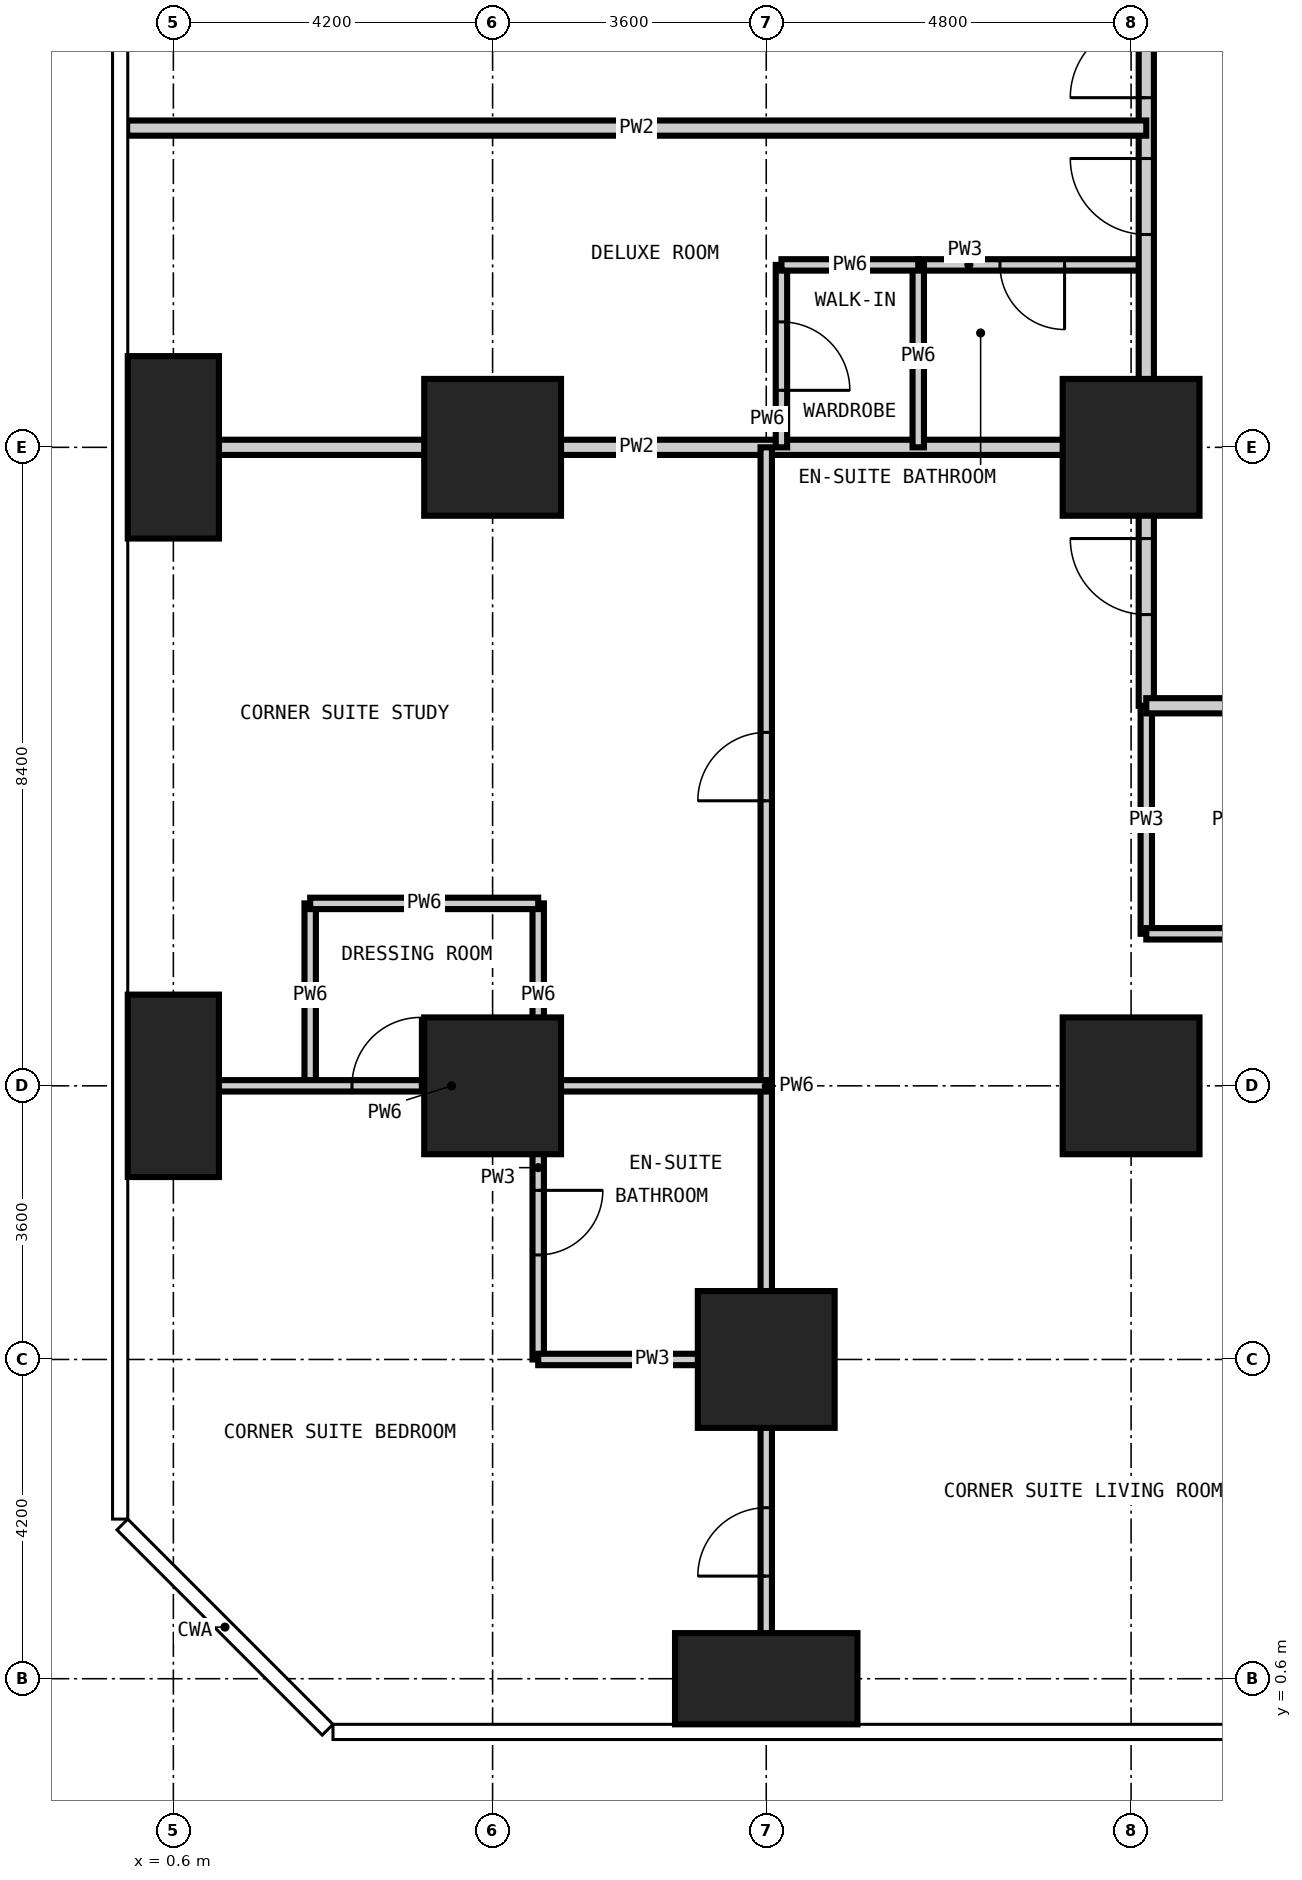
"""IFC4 building model, lengths in metres.
Left out: names, types, materials, properties, quantities, classifications, styles, units other than length and angle.
Written with IfcOpenShell. Run it as: python <this file> out.ifc"""

import sys

from ifc_helpers import new_model, si_unit, direction, frame, frame_2d, origin, origin_2d, place, context, subcontext, project, spatial, rectangle, extrude, element, fill, save


model = new_model("IFC4")
c1 = context("Model", 3, precision=1e-05, world=origin(), true_north=direction((0.0, 1.0)))
c2 = subcontext(c1, "Body", "Model", "MODEL_VIEW")
j1 = project(units=[si_unit("LENGTHUNIT", "METRE"), si_unit("PLANEANGLEUNIT", "RADIAN")], contexts=[c1])
p1 = place(None, origin())
s1 = spatial("IfcSite", under=j1, at=p1, CompositionType="ELEMENT")
p2 = place(p1, origin())
s2 = spatial("IfcBuilding", under=s1, at=p2, CompositionType="ELEMENT")
p3 = place(p2, frame((0.0, 0.0, 27.0)))
s3 = spatial("IfcBuildingStorey", under=s2, at=p3, CompositionType="ELEMENT", Elevation=27.0)
for number, where, z_axis, x_axis in (
    (1, (0.6, 8.4, -0.35), (0.0, 0.0, 1.0), (1.0, 0.0, 0.0)),
    (2, (0.6, 16.8, -0.35), (0.0, 0.0, 1.0), (1.0, 0.0, 0.0)),
):
    element("IfcColumn", number, at=place(p3, frame(where, z_axis=z_axis, x_axis=x_axis)), inside=s3, PredefinedType="COLUMN", context=c2, shape_type="SweptSolid", body=[
        extrude(rectangle(XDim=1.2, YDim=2.4, at=origin_2d()), origin(), (0.0, 0.0, 1.0), 3.6),
    ])
for number, where, z_axis, x_axis in (
    (3, (4.8, 8.4, -0.35), (0.0, 0.0, 1.0), (1.0, 0.0, 0.0)),
    (4, (4.8, 16.8, -0.35), (0.0, 0.0, 1.0), (1.0, 0.0, 0.0)),
):
    element("IfcColumn", number, at=place(p3, frame(where, z_axis=z_axis, x_axis=x_axis)), inside=s3, PredefinedType="COLUMN", context=c2, shape_type="SweptSolid", body=[
        extrude(rectangle(XDim=1.8, YDim=1.8, at=origin_2d()), origin(), (0.0, 0.0, 1.0), 3.6),
    ])
p4 = place(p3, frame((8.4, 0.6, -0.35), z_axis=(0.0, 0.0, 1.0), x_axis=(1.0, 0.0, 0.0)))
e5 = element("IfcColumn", 5, at=p4, inside=s3, PredefinedType="COLUMN", context=c2, shape_type="SweptSolid", body=[
    extrude(rectangle(XDim=2.4, YDim=1.2, at=origin_2d()), origin(), (0.0, 0.0, 1.0), 3.6),
])
for number, where, z_axis, x_axis in (
    (6, (8.4, 4.8, -0.35), (0.0, 0.0, 1.0), (1.0, 0.0, 0.0)),
    (7, (13.2, 8.4, -0.35), (0.0, 0.0, 1.0), (1.0, 0.0, 0.0)),
    (8, (13.2, 16.8, -0.35), (0.0, 0.0, 1.0), (1.0, 0.0, 0.0)),
):
    element("IfcColumn", number, at=place(p3, frame(where, z_axis=z_axis, x_axis=x_axis)), inside=s3, PredefinedType="COLUMN", context=c2, shape_type="SweptSolid", body=[
        extrude(rectangle(XDim=1.8, YDim=1.8, at=origin_2d()), origin(), (0.0, 0.0, 1.0), 3.6),
    ])
p5 = place(p3, frame((5.4, 4.8, 0.0), z_axis=(0.0, 0.0, 1.0), x_axis=(0.0, 1.0, 0.0)))
e9 = element("IfcWall", 9, at=p5, inside=s3, PredefinedType="PARTITIONING", context=c2, shape_type="SweptSolid", body=[
    extrude(rectangle(XDim=3.6, YDim=0.15, at=frame_2d((1.8, 0.0))), origin(), (0.0, 0.0, 1.0), 3.25),
])
p6 = place(p5, frame((1.375, 0.0, 0.0)))
e10 = element("IfcOpeningElement", 10, at=p6, cuts=e9, PredefinedType="OPENING", context=c2, shape_type="SweptSolid", body=[
    extrude(rectangle(XDim=0.85, YDim=2.1, at=frame_2d((0.425, 1.05))), frame((0.0, 0.085, 0.0), z_axis=(0.0, -1.0, 0.0), x_axis=(1.0, 0.0, 0.0)), (0.0, 0.0, 1.0), 0.17),
])
for number, where, z_axis, x_axis in (
    (11, (13.4, 10.4, 0.0), (0.0, 0.0, 1.0), (0.0, 1.0, 0.0)),
    (12, (5.4, 4.8, 0.0), (0.0, 0.0, 1.0), (1.0, 0.0, 0.0)),
):
    element("IfcWall", number, at=place(p3, frame(where, z_axis=z_axis, x_axis=x_axis)), inside=s3, PredefinedType="PARTITIONING", context=c2, shape_type="SweptSolid", body=[
        extrude(rectangle(XDim=3.0, YDim=0.15, at=frame_2d((1.5, 0.0))), origin(), (0.0, 0.0, 1.0), 3.25),
    ])
p7 = place(p3, frame((13.4, 10.4, 0.0), z_axis=(0.0, 0.0, 1.0), x_axis=(1.0, 0.0, 0.0)))
e13 = element("IfcWall", 13, at=p7, inside=s3, PredefinedType="PARTITIONING", context=c2, shape_type="SweptSolid", body=[
    extrude(rectangle(XDim=3.4, YDim=0.15, at=frame_2d((1.7, 0.0))), origin(), (0.0, 0.0, 1.0), 3.25),
])
p8 = place(p7, frame((1.275, 0.0, 0.0)))
e14 = element("IfcOpeningElement", 14, at=p8, cuts=e13, PredefinedType="OPENING", context=c2, shape_type="SweptSolid", body=[
    extrude(rectangle(XDim=0.85, YDim=2.1, at=frame_2d((0.425, 1.05))), frame((0.0, 0.085, 0.0), z_axis=(0.0, -1.0, 0.0), x_axis=(1.0, 0.0, 0.0)), (0.0, 0.0, 1.0), 0.17),
])
p9 = place(p3, frame((10.4, 19.2, 0.0), z_axis=(0.0, 0.0, 1.0), x_axis=(1.0, 0.0, 0.0)))
e15 = element("IfcWall", 15, at=p9, inside=s3, PredefinedType="PARTITIONING", context=c2, shape_type="SweptSolid", body=[
    extrude(rectangle(XDim=3.0, YDim=0.15, at=frame_2d((1.5, 0.0))), origin(), (0.0, 0.0, 1.0), 3.25),
])
p10 = place(p9, frame((1.075, 0.0, 0.0)))
e16 = element("IfcOpeningElement", 16, at=p10, cuts=e15, PredefinedType="OPENING", context=c2, shape_type="SweptSolid", body=[
    extrude(rectangle(XDim=0.85, YDim=2.1, at=frame_2d((0.425, 1.05))), frame((0.0, 0.085, 0.0), z_axis=(0.0, -1.0, 0.0), x_axis=(1.0, 0.0, 0.0)), (0.0, 0.0, 1.0), 0.17),
])
p11 = place(p3, frame((13.4, 13.4, 0.0), z_axis=(0.0, 0.0, 1.0), x_axis=(0.0, 1.0, 0.0)))
e17 = element("IfcWall", 17, at=p11, inside=s3, PredefinedType="PARTITIONING", context=c2, shape_type="SweptSolid", body=[
    extrude(rectangle(XDim=20.2, YDim=0.2, at=frame_2d((10.1, 0.0))), origin(), (0.0, 0.0, 1.0), 3.25),
])
p12 = place(p11, frame((6.2, 0.0, 0.0)))
e18 = element("IfcOpeningElement", 18, at=p12, cuts=e17, PredefinedType="OPENING", context=c2, shape_type="SweptSolid", body=[
    extrude(rectangle(XDim=1.0, YDim=2.2, at=frame_2d((0.5, 1.1))), frame((0.0, 0.11, 0.0), z_axis=(0.0, -1.0, 0.0), x_axis=(1.0, 0.0, 0.0)), (0.0, 0.0, 1.0), 0.22),
])
p13 = place(p11, frame((8.0, 0.0, 0.0)))
e19 = element("IfcOpeningElement", 19, at=p13, cuts=e17, PredefinedType="OPENING", context=c2, shape_type="SweptSolid", body=[
    extrude(rectangle(XDim=1.0, YDim=2.2, at=frame_2d((0.5, 1.1))), frame((0.0, 0.11, 0.0), z_axis=(0.0, -1.0, 0.0), x_axis=(1.0, 0.0, 0.0)), (0.0, 0.0, 1.0), 0.22),
])
p14 = place(p11, frame((14.6, 0.0, 0.0)))
e20 = element("IfcOpeningElement", 20, at=p14, cuts=e17, PredefinedType="OPENING", context=c2, shape_type="SweptSolid", body=[
    extrude(rectangle(XDim=1.0, YDim=2.2, at=frame_2d((0.5, 1.1))), frame((0.0, 0.11, 0.0), z_axis=(0.0, -1.0, 0.0), x_axis=(1.0, 0.0, 0.0)), (0.0, 0.0, 1.0), 0.22),
])
p15 = place(p11, frame((16.4, 0.0, 0.0)))
e21 = element("IfcOpeningElement", 21, at=p15, cuts=e17, PredefinedType="OPENING", context=c2, shape_type="SweptSolid", body=[
    extrude(rectangle(XDim=1.0, YDim=2.2, at=frame_2d((0.5, 1.1))), frame((0.0, 0.11, 0.0), z_axis=(0.0, -1.0, 0.0), x_axis=(1.0, 0.0, 0.0)), (0.0, 0.0, 1.0), 0.22),
])
p16 = place(p11, frame((1.2, 0.0, 0.0)))
e22 = element("IfcOpeningElement", 22, at=p16, cuts=e17, PredefinedType="OPENING", context=c2, shape_type="SweptSolid", body=[
    extrude(rectangle(XDim=1.0, YDim=2.2, at=frame_2d((0.5, 1.1))), frame((0.0, 0.11, 0.0), z_axis=(0.0, -1.0, 0.0), x_axis=(1.0, 0.0, 0.0)), (0.0, 0.0, 1.0), 0.22),
])
p17 = place(p3, frame((45.7, 13.4, 0.0), z_axis=(0.0, 0.0, 1.0), x_axis=(-1.0, 0.0, 0.0)))
e23 = element("IfcWall", 23, at=p17, inside=s3, PredefinedType="PARTITIONING", context=c2, shape_type="SweptSolid", body=[
    extrude(rectangle(XDim=32.3, YDim=0.2, at=frame_2d((16.15, 0.0))), origin(), (0.0, 0.0, 1.0), 3.25),
])
p18 = place(p17, frame((25.1, 0.0, 0.0)))
e24 = element("IfcOpeningElement", 24, at=p18, cuts=e23, PredefinedType="OPENING", context=c2, shape_type="SweptSolid", body=[
    extrude(rectangle(XDim=1.0, YDim=2.2, at=frame_2d((0.5, 1.1))), frame((0.0, 0.11, 0.0), z_axis=(0.0, -1.0, 0.0), x_axis=(1.0, 0.0, 0.0)), (0.0, 0.0, 1.0), 0.22),
])
p19 = place(p17, frame((23.3, 0.0, 0.0)))
e25 = element("IfcOpeningElement", 25, at=p19, cuts=e23, PredefinedType="OPENING", context=c2, shape_type="SweptSolid", body=[
    extrude(rectangle(XDim=1.0, YDim=2.2, at=frame_2d((0.5, 1.1))), frame((0.0, 0.11, 0.0), z_axis=(0.0, -1.0, 0.0), x_axis=(1.0, 0.0, 0.0)), (0.0, 0.0, 1.0), 0.22),
])
p20 = place(p17, frame((16.7, 0.0, 0.0)))
e26 = element("IfcOpeningElement", 26, at=p20, cuts=e23, PredefinedType="OPENING", context=c2, shape_type="SweptSolid", body=[
    extrude(rectangle(XDim=1.0, YDim=2.2, at=frame_2d((0.5, 1.1))), frame((0.0, 0.11, 0.0), z_axis=(0.0, -1.0, 0.0), x_axis=(1.0, 0.0, 0.0)), (0.0, 0.0, 1.0), 0.22),
])
p21 = place(p17, frame((14.9, 0.0, 0.0)))
e27 = element("IfcOpeningElement", 27, at=p21, cuts=e23, PredefinedType="OPENING", context=c2, shape_type="SweptSolid", body=[
    extrude(rectangle(XDim=1.0, YDim=2.2, at=frame_2d((0.5, 1.1))), frame((0.0, 0.11, 0.0), z_axis=(0.0, -1.0, 0.0), x_axis=(1.0, 0.0, 0.0)), (0.0, 0.0, 1.0), 0.22),
])
p22 = place(p17, frame((8.3, 0.0, 0.0)))
e28 = element("IfcOpeningElement", 28, at=p22, cuts=e23, PredefinedType="OPENING", context=c2, shape_type="SweptSolid", body=[
    extrude(rectangle(XDim=1.0, YDim=2.2, at=frame_2d((0.5, 1.1))), frame((0.0, 0.11, 0.0), z_axis=(0.0, -1.0, 0.0), x_axis=(1.0, 0.0, 0.0)), (0.0, 0.0, 1.0), 0.22),
])
p23 = place(p17, frame((6.5, 0.0, 0.0)))
e29 = element("IfcOpeningElement", 29, at=p23, cuts=e23, PredefinedType="OPENING", context=c2, shape_type="SweptSolid", body=[
    extrude(rectangle(XDim=1.0, YDim=2.2, at=frame_2d((0.5, 1.1))), frame((0.0, 0.11, 0.0), z_axis=(0.0, -1.0, 0.0), x_axis=(1.0, 0.0, 0.0)), (0.0, 0.0, 1.0), 0.22),
])
for number, where, z_axis, x_axis in (
    (30, (-0.008, 16.8, 0.0), (0.0, 0.0, 1.0), (1.0, 0.0, 0.0)),
    (31, (-0.008, 21.0, 0.0), (0.0, 0.0, 1.0), (1.0, 0.0, 0.0)),
):
    element("IfcWall", number, at=place(p3, frame(where, z_axis=z_axis, x_axis=x_axis)), inside=s3, PredefinedType="PARTITIONING", context=c2, shape_type="SweptSolid", body=[
        extrude(rectangle(XDim=13.408, YDim=0.2, at=frame_2d((6.704, 0.0))), origin(), (0.0, 0.0, 1.0), 3.25),
    ])
for number, where, z_axis, x_axis in (
    (32, (2.4, 8.4, 0.0), (0.0, 0.0, 1.0), (0.0, 1.0, 0.0)),
    (33, (5.4, 8.4, 0.0), (0.0, 0.0, 1.0), (0.0, 1.0, 0.0)),
):
    element("IfcWall", number, at=place(p3, frame(where, z_axis=z_axis, x_axis=x_axis)), inside=s3, PredefinedType="PARTITIONING", context=c2, shape_type="SweptSolid", body=[
        extrude(rectangle(XDim=2.4, YDim=0.15, at=frame_2d((1.2, 0.0))), origin(), (0.0, 0.0, 1.0), 3.25),
    ])
p24 = place(p3, frame((8.4, -0.008, 0.0), z_axis=(0.0, 0.0, 1.0), x_axis=(0.0, 1.0, 0.0)))
e34 = element("IfcWall", 34, at=p24, inside=s3, PredefinedType="PARTITIONING", context=c2, shape_type="SweptSolid", body=[
    extrude(rectangle(XDim=16.808, YDim=0.15, at=frame_2d((8.404, 0.0))), origin(), (0.0, 0.0, 1.0), 3.25),
])
p25 = place(p24, frame((1.958, 0.0, 0.0)))
e35 = element("IfcOpeningElement", 35, at=p25, cuts=e34, PredefinedType="OPENING", context=c2, shape_type="SweptSolid", body=[
    extrude(rectangle(XDim=0.9, YDim=2.1, at=frame_2d((0.45, 1.05))), frame((0.0, 0.085, 0.0), z_axis=(0.0, -1.0, 0.0), x_axis=(1.0, 0.0, 0.0)), (0.0, 0.0, 1.0), 0.17),
])
p26 = place(p24, frame((12.158, 0.0, 0.0)))
e36 = element("IfcOpeningElement", 36, at=p26, cuts=e34, PredefinedType="OPENING", context=c2, shape_type="SweptSolid", body=[
    extrude(rectangle(XDim=0.9, YDim=2.1, at=frame_2d((0.45, 1.05))), frame((0.0, 0.085, 0.0), z_axis=(0.0, -1.0, 0.0), x_axis=(1.0, 0.0, 0.0)), (0.0, 0.0, 1.0), 0.17),
])
p27 = place(p3, frame((8.6, 16.8, 0.0), z_axis=(0.0, 0.0, 1.0), x_axis=(0.0, 1.0, 0.0)))
e37 = element("IfcWall", 37, at=p27, inside=s3, PredefinedType="PARTITIONING", context=c2, shape_type="SweptSolid", body=[
    extrude(rectangle(XDim=2.4, YDim=0.15, at=frame_2d((1.2, 0.0))), origin(), (0.0, 0.0, 1.0), 3.25),
])
p28 = place(p27, frame((0.75, 0.0, 0.0)))
e38 = element("IfcOpeningElement", 38, at=p28, cuts=e37, PredefinedType="OPENING", context=c2, shape_type="SweptSolid", body=[
    extrude(rectangle(XDim=0.9, YDim=2.1, at=frame_2d((0.45, 1.05))), frame((0.0, 0.085, 0.0), z_axis=(0.0, -1.0, 0.0), x_axis=(1.0, 0.0, 0.0)), (0.0, 0.0, 1.0), 0.17),
])
p29 = place(p3, frame((10.4, 16.8, 0.0), z_axis=(0.0, 0.0, 1.0), x_axis=(0.0, 1.0, 0.0)))
e39 = element("IfcWall", 39, at=p29, inside=s3, PredefinedType="PARTITIONING", context=c2, shape_type="SweptSolid", body=[
    extrude(rectangle(XDim=2.4, YDim=0.15, at=frame_2d((1.2, 0.0))), origin(), (0.0, 0.0, 1.0), 3.25),
])
p30 = place(p3, frame((-0.008, 8.4, 0.0), z_axis=(0.0, 0.0, 1.0), x_axis=(1.0, 0.0, 0.0)))
e40 = element("IfcWall", 40, at=p30, inside=s3, PredefinedType="PARTITIONING", context=c2, shape_type="SweptSolid", body=[
    extrude(rectangle(XDim=8.408, YDim=0.15, at=frame_2d((4.204, 0.0))), origin(), (0.0, 0.0, 1.0), 3.25),
])
p31 = place(p30, frame((2.958, 0.0, 0.0)))
e41 = element("IfcOpeningElement", 41, at=p31, cuts=e40, PredefinedType="OPENING", context=c2, shape_type="SweptSolid", body=[
    extrude(rectangle(XDim=0.9, YDim=2.1, at=frame_2d((0.45, 1.05))), frame((0.0, 0.085, 0.0), z_axis=(0.0, -1.0, 0.0), x_axis=(1.0, 0.0, 0.0)), (0.0, 0.0, 1.0), 0.17),
])
p32 = place(p3, frame((2.4, 10.8, 0.0), z_axis=(0.0, 0.0, 1.0), x_axis=(1.0, 0.0, 0.0)))
e42 = element("IfcWall", 42, at=p32, inside=s3, PredefinedType="PARTITIONING", context=c2, shape_type="SweptSolid", body=[
    extrude(rectangle(XDim=3.0, YDim=0.15, at=frame_2d((1.5, 0.0))), origin(), (0.0, 0.0, 1.0), 3.25),
])
p33 = place(p3, frame((8.6, 19.2, 0.0), z_axis=(0.0, 0.0, 1.0), x_axis=(1.0, 0.0, 0.0)))
e43 = element("IfcWall", 43, at=p33, inside=s3, PredefinedType="PARTITIONING", context=c2, shape_type="SweptSolid", body=[
    extrude(rectangle(XDim=1.8, YDim=0.15, at=frame_2d((0.9, 0.0))), origin(), (0.0, 0.0, 1.0), 3.25),
])
p34 = place(p12, origin())
e44 = element("IfcDoor", 44, at=p34, inside=s3, OperationType="SINGLE_SWING_RIGHT", PredefinedType="DOOR", context=c2, shape_type="SweptSolid", body=[
    extrude(rectangle(XDim=1.0, YDim=2.2, at=frame_2d((0.5, 1.1))), frame((0.0, 0.025, 0.0), z_axis=(0.0, -1.0, 0.0), x_axis=(1.0, 0.0, 0.0)), (0.0, 0.0, 1.0), 0.05),
])
fill(e18, e44)
p35 = place(p10, frame((0.85, 0.0, 0.0), z_axis=(0.0, 0.0, 1.0), x_axis=(-1.0, 0.0, 0.0)))
e45 = element("IfcDoor", 45, at=p35, inside=s3, OperationType="SINGLE_SWING_LEFT", PredefinedType="DOOR", context=c2, shape_type="SweptSolid", body=[
    extrude(rectangle(XDim=0.85, YDim=2.1, at=frame_2d((0.425, 1.05))), frame((0.0, 0.025, 0.0), z_axis=(0.0, -1.0, 0.0), x_axis=(1.0, 0.0, 0.0)), (0.0, 0.0, 1.0), 0.05),
])
fill(e16, e45)
p36 = place(p28, frame((0.9, 0.0, 0.0), z_axis=(0.0, 0.0, 1.0), x_axis=(-1.0, 0.0, 0.0)))
e46 = element("IfcDoor", 46, at=p36, inside=s3, OperationType="SINGLE_SWING_RIGHT", PredefinedType="DOOR", context=c2, shape_type="SweptSolid", body=[
    extrude(rectangle(XDim=0.9, YDim=2.1, at=frame_2d((0.45, 1.05))), frame((0.0, 0.025, 0.0), z_axis=(0.0, -1.0, 0.0), x_axis=(1.0, 0.0, 0.0)), (0.0, 0.0, 1.0), 0.05),
])
fill(e38, e46)
p37 = place(p13, origin())
e47 = element("IfcDoor", 47, at=p37, inside=s3, OperationType="SINGLE_SWING_LEFT", PredefinedType="DOOR", context=c2, shape_type="SweptSolid", body=[
    extrude(rectangle(XDim=1.0, YDim=2.2, at=frame_2d((0.5, 1.1))), frame((0.0, 0.025, 0.0), z_axis=(0.0, -1.0, 0.0), x_axis=(1.0, 0.0, 0.0)), (0.0, 0.0, 1.0), 0.05),
])
fill(e19, e47)
p38 = place(p16, origin())
e48 = element("IfcDoor", 48, at=p38, inside=s3, OperationType="SINGLE_SWING_RIGHT", PredefinedType="DOOR", context=c2, shape_type="SweptSolid", body=[
    extrude(rectangle(XDim=1.0, YDim=2.2, at=frame_2d((0.5, 1.1))), frame((0.0, 0.025, 0.0), z_axis=(0.0, -1.0, 0.0), x_axis=(1.0, 0.0, 0.0)), (0.0, 0.0, 1.0), 0.05),
])
fill(e22, e48)
p39 = place(p25, origin())
e49 = element("IfcDoor", 49, at=p39, inside=s3, OperationType="SINGLE_SWING_LEFT", PredefinedType="DOOR", context=c2, shape_type="SweptSolid", body=[
    extrude(rectangle(XDim=0.9, YDim=2.1, at=frame_2d((0.45, 1.05))), frame((0.0, 0.025, 0.0), z_axis=(0.0, -1.0, 0.0), x_axis=(1.0, 0.0, 0.0)), (0.0, 0.0, 1.0), 0.05),
])
fill(e35, e49)
p40 = place(p6, frame((0.85, 0.0, 0.0), z_axis=(0.0, 0.0, 1.0), x_axis=(-1.0, 0.0, 0.0)))
e50 = element("IfcDoor", 50, at=p40, inside=s3, OperationType="SINGLE_SWING_LEFT", PredefinedType="DOOR", context=c2, shape_type="SweptSolid", body=[
    extrude(rectangle(XDim=0.85, YDim=2.1, at=frame_2d((0.425, 1.05))), frame((0.0, 0.025, 0.0), z_axis=(0.0, -1.0, 0.0), x_axis=(1.0, 0.0, 0.0)), (0.0, 0.0, 1.0), 0.05),
])
fill(e10, e50)
p41 = place(p31, origin())
e51 = element("IfcDoor", 51, at=p41, inside=s3, OperationType="SINGLE_SWING_RIGHT", PredefinedType="DOOR", context=c2, shape_type="SweptSolid", body=[
    extrude(rectangle(XDim=0.9, YDim=2.1, at=frame_2d((0.45, 1.05))), frame((0.0, 0.025, 0.0), z_axis=(0.0, -1.0, 0.0), x_axis=(1.0, 0.0, 0.0)), (0.0, 0.0, 1.0), 0.05),
])
fill(e41, e51)
p42 = place(p26, origin())
e52 = element("IfcDoor", 52, at=p42, inside=s3, OperationType="SINGLE_SWING_LEFT", PredefinedType="DOOR", context=c2, shape_type="SweptSolid", body=[
    extrude(rectangle(XDim=0.9, YDim=2.1, at=frame_2d((0.45, 1.05))), frame((0.0, 0.025, 0.0), z_axis=(0.0, -1.0, 0.0), x_axis=(1.0, 0.0, 0.0)), (0.0, 0.0, 1.0), 0.05),
])
fill(e36, e52)
save(model, sys.argv[1])
